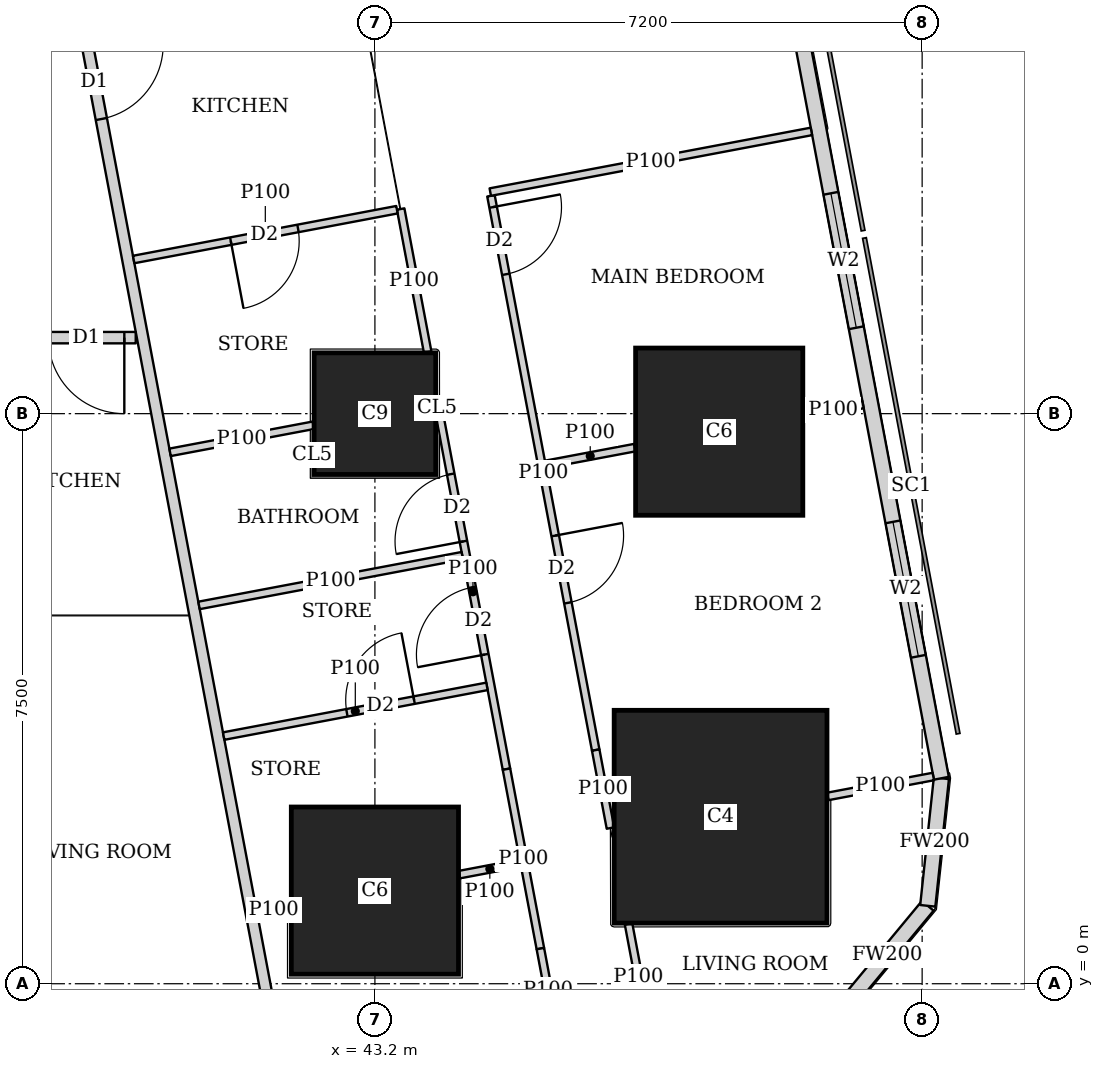
"""IFC4 building model, lengths in metres.
Left out: names, types, materials, properties, quantities, classifications, styles, units other than length and angle.
Written with IfcOpenShell. Run it as: python <this file> out.ifc"""

import sys

from ifc_helpers import new_model, si_unit, direction, frame, frame_2d, origin, origin_2d, place, context, subcontext, project, spatial, rectangle, extrude, element, fill, save


model = new_model("IFC4")
c1 = context("Model", 3, precision=1e-05, world=origin(), true_north=direction((0.0, 1.0)))
c2 = subcontext(c1, "Body", "Model", "MODEL_VIEW")
j1 = project(units=[si_unit("LENGTHUNIT", "METRE"), si_unit("PLANEANGLEUNIT", "RADIAN")], contexts=[c1])
p1 = place(None, origin())
s1 = spatial("IfcSite", under=j1, at=p1, CompositionType="ELEMENT")
p2 = place(p1, origin())
s2 = spatial("IfcBuilding", under=s1, at=p2, CompositionType="ELEMENT")
p3 = place(p2, frame((0.0, 0.0, 89.15)))
s3 = spatial("IfcBuildingStorey", under=s2, at=p3, CompositionType="ELEMENT", Elevation=89.15)
p4 = place(p3, frame((43.2, 1.225, 0.0), z_axis=(0.0, 0.0, 1.0), x_axis=(1.0, 0.0, 0.0)))
e1 = element("IfcColumn", 1, at=p4, inside=s3, PredefinedType="COLUMN", context=c2, shape_type="SweptSolid", body=[
    extrude(rectangle(XDim=2.2, YDim=2.2, at=origin_2d()), origin(), (0.0, 0.0, 1.0), 3.75),
])
p5 = place(p3, frame((47.748, 2.197, 0.0), z_axis=(0.0, 0.0, 1.0), x_axis=(1.0, 0.0, 0.0)))
e2 = element("IfcColumn", 2, at=p5, inside=s3, PredefinedType="COLUMN", context=c2, shape_type="SweptSolid", body=[
    extrude(rectangle(XDim=2.8, YDim=2.8, at=origin_2d()), origin(), (0.0, 0.0, 1.0), 3.75),
])
p6 = place(p3, frame((43.2, 7.5, 0.0), z_axis=(0.0, 0.0, 1.0), x_axis=(1.0, 0.0, 0.0)))
e3 = element("IfcColumn", 3, at=p6, inside=s3, PredefinedType="COLUMN", context=c2, shape_type="SweptSolid", body=[
    extrude(rectangle(XDim=1.6, YDim=1.6, at=origin_2d()), origin(), (0.0, 0.0, 1.0), 3.75),
])
p7 = place(p3, frame((47.73, 7.263, 0.0), z_axis=(0.0, 0.0, 1.0), x_axis=(1.0, 0.0, 0.0)))
e4 = element("IfcColumn", 4, at=p7, inside=s3, PredefinedType="COLUMN", context=c2, shape_type="SweptSolid", body=[
    extrude(rectangle(XDim=2.2, YDim=2.2, at=origin_2d()), origin(), (0.0, 0.0, 1.0), 3.75),
])
p8 = place(p3, frame((49.407, -0.263, 0.0), z_axis=(0.0, 0.0, 1.0), x_axis=(0.638042593423, 0.770001070764, 0.0)))
e5 = element("IfcWall", 5, at=p8, inside=s3, PredefinedType="SOLIDWALL", context=c2, shape_type="SweptSolid", body=[
    extrude(rectangle(XDim=1.673, YDim=0.2, at=frame_2d((0.836, 0.0))), origin(), (0.0, 0.0, 1.0), 3.5),
])
p9 = place(p3, frame((50.474, 1.025, 0.0), z_axis=(0.0, 0.0, 1.0), x_axis=(0.106047815515, 0.994361031429, 0.0)))
e6 = element("IfcWall", 6, at=p9, inside=s3, PredefinedType="SOLIDWALL", context=c2, shape_type="SweptSolid", body=[
    extrude(rectangle(XDim=1.688, YDim=0.2, at=frame_2d((0.844, 0.0))), origin(), (0.0, 0.0, 1.0), 3.5),
])
p10 = place(p3, frame((50.653, 2.703, 0.0), z_axis=(0.0, 0.0, 1.0), x_axis=(-0.185612026696, 0.982623109613, 0.0)))
e7 = element("IfcWall", 7, at=p10, inside=s3, PredefinedType="SOLIDWALL", context=c2, shape_type="SweptSolid", body=[
    extrude(rectangle(XDim=41.393, YDim=0.2, at=frame_2d((20.697, 0.0))), origin(), (0.0, 0.0, 1.0), 3.5),
])
p11 = place(p10, frame((1.633, 0.0, 0.9)))
e8 = element("IfcOpeningElement", 8, at=p11, cuts=e7, PredefinedType="OPENING", context=c2, shape_type="SweptSolid", body=[
    extrude(rectangle(XDim=1.8, YDim=1.5, at=frame_2d((0.9, 0.75))), frame((0.0, 0.11, 0.0), z_axis=(0.0, -1.0, 0.0), x_axis=(1.0, 0.0, 0.0)), (0.0, 0.0, 1.0), 0.22),
])
p12 = place(p10, frame((6.032, 0.0, 0.9)))
e9 = element("IfcOpeningElement", 9, at=p12, cuts=e7, PredefinedType="OPENING", context=c2, shape_type="SweptSolid", body=[
    extrude(rectangle(XDim=1.8, YDim=1.5, at=frame_2d((0.9, 0.75))), frame((0.0, 0.11, 0.0), z_axis=(0.0, -1.0, 0.0), x_axis=(1.0, 0.0, 0.0)), (0.0, 0.0, 1.0), 0.22),
])
p13 = place(p10, frame((9.848, 0.0, 0.9)))
e10 = element("IfcOpeningElement", 10, at=p13, cuts=e7, PredefinedType="OPENING", context=c2, shape_type="SweptSolid", body=[
    extrude(rectangle(XDim=1.8, YDim=1.5, at=frame_2d((0.9, 0.75))), frame((0.0, 0.11, 0.0), z_axis=(0.0, -1.0, 0.0), x_axis=(1.0, 0.0, 0.0)), (0.0, 0.0, 1.0), 0.22),
])
p14 = place(p10, frame((13.664, 0.0, 0.9)))
e11 = element("IfcOpeningElement", 11, at=p14, cuts=e7, PredefinedType="OPENING", context=c2, shape_type="SweptSolid", body=[
    extrude(rectangle(XDim=1.8, YDim=1.5, at=frame_2d((0.9, 0.75))), frame((0.0, 0.11, 0.0), z_axis=(0.0, -1.0, 0.0), x_axis=(1.0, 0.0, 0.0)), (0.0, 0.0, 1.0), 0.22),
])
p15 = place(p10, frame((17.481, 0.0, 0.9)))
e12 = element("IfcOpeningElement", 12, at=p15, cuts=e7, PredefinedType="OPENING", context=c2, shape_type="SweptSolid", body=[
    extrude(rectangle(XDim=1.8, YDim=1.5, at=frame_2d((0.9, 0.75))), frame((0.0, 0.11, 0.0), z_axis=(0.0, -1.0, 0.0), x_axis=(1.0, 0.0, 0.0)), (0.0, 0.0, 1.0), 0.22),
])
p16 = place(p10, frame((21.297, 0.0, 0.9)))
e13 = element("IfcOpeningElement", 13, at=p16, cuts=e7, PredefinedType="OPENING", context=c2, shape_type="SweptSolid", body=[
    extrude(rectangle(XDim=1.8, YDim=1.5, at=frame_2d((0.9, 0.75))), frame((0.0, 0.11, 0.0), z_axis=(0.0, -1.0, 0.0), x_axis=(1.0, 0.0, 0.0)), (0.0, 0.0, 1.0), 0.22),
])
p17 = place(p10, frame((25.113, 0.0, 0.9)))
e14 = element("IfcOpeningElement", 14, at=p17, cuts=e7, PredefinedType="OPENING", context=c2, shape_type="SweptSolid", body=[
    extrude(rectangle(XDim=1.8, YDim=1.5, at=frame_2d((0.9, 0.75))), frame((0.0, 0.11, 0.0), z_axis=(0.0, -1.0, 0.0), x_axis=(1.0, 0.0, 0.0)), (0.0, 0.0, 1.0), 0.22),
])
p18 = place(p10, frame((28.93, 0.0, 0.9)))
e15 = element("IfcOpeningElement", 15, at=p18, cuts=e7, PredefinedType="OPENING", context=c2, shape_type="SweptSolid", body=[
    extrude(rectangle(XDim=1.8, YDim=1.5, at=frame_2d((0.9, 0.75))), frame((0.0, 0.11, 0.0), z_axis=(0.0, -1.0, 0.0), x_axis=(1.0, 0.0, 0.0)), (0.0, 0.0, 1.0), 0.22),
])
p19 = place(p10, frame((32.746, 0.0, 0.9)))
e16 = element("IfcOpeningElement", 16, at=p19, cuts=e7, PredefinedType="OPENING", context=c2, shape_type="SweptSolid", body=[
    extrude(rectangle(XDim=1.8, YDim=1.5, at=frame_2d((0.9, 0.75))), frame((0.0, 0.11, 0.0), z_axis=(0.0, -1.0, 0.0), x_axis=(1.0, 0.0, 0.0)), (0.0, 0.0, 1.0), 0.22),
])
p20 = place(p10, frame((36.481, 0.0, 0.9)))
e17 = element("IfcOpeningElement", 17, at=p20, cuts=e7, PredefinedType="OPENING", context=c2, shape_type="SweptSolid", body=[
    extrude(rectangle(XDim=1.8, YDim=1.5, at=frame_2d((0.9, 0.75))), frame((0.0, 0.11, 0.0), z_axis=(0.0, -1.0, 0.0), x_axis=(1.0, 0.0, 0.0)), (0.0, 0.0, 1.0), 0.22),
])
p21 = place(p3, frame((40.053, 8.5, 0.0), z_axis=(0.0, 0.0, 1.0), x_axis=(-1.0, 0.0, 0.0)))
e18 = element("IfcWall", 18, at=p21, inside=s3, PredefinedType="SOLIDWALL", context=c2, shape_type="SweptSolid", body=[
    extrude(rectangle(XDim=31.703, YDim=0.15, at=frame_2d((15.852, 0.0))), origin(), (0.0, 0.0, 1.0), 3.5),
])
p22 = place(p21, frame((28.103, 0.0, 0.0)))
e19 = element("IfcOpeningElement", 19, at=p22, cuts=e18, PredefinedType="OPENING", context=c2, shape_type="SweptSolid", body=[
    extrude(rectangle(XDim=1.0, YDim=2.1, at=frame_2d((0.5, 1.05))), frame((0.0, 0.085, 0.0), z_axis=(0.0, -1.0, 0.0), x_axis=(1.0, 0.0, 0.0)), (0.0, 0.0, 1.0), 0.17),
])
p23 = place(p21, frame((19.953, 0.0, 0.0)))
e20 = element("IfcOpeningElement", 20, at=p23, cuts=e18, PredefinedType="OPENING", context=c2, shape_type="SweptSolid", body=[
    extrude(rectangle(XDim=1.0, YDim=2.1, at=frame_2d((0.5, 1.05))), frame((0.0, 0.085, 0.0), z_axis=(0.0, -1.0, 0.0), x_axis=(1.0, 0.0, 0.0)), (0.0, 0.0, 1.0), 0.17),
])
p24 = place(p21, frame((12.753, 0.0, 0.0)))
e21 = element("IfcOpeningElement", 21, at=p24, cuts=e18, PredefinedType="OPENING", context=c2, shape_type="SweptSolid", body=[
    extrude(rectangle(XDim=1.0, YDim=2.1, at=frame_2d((0.5, 1.05))), frame((0.0, 0.085, 0.0), z_axis=(0.0, -1.0, 0.0), x_axis=(1.0, 0.0, 0.0)), (0.0, 0.0, 1.0), 0.17),
])
p25 = place(p21, frame((0.15, 0.0, 0.0)))
e22 = element("IfcOpeningElement", 22, at=p25, cuts=e18, PredefinedType="OPENING", context=c2, shape_type="SweptSolid", body=[
    extrude(rectangle(XDim=1.0, YDim=2.1, at=frame_2d((0.5, 1.05))), frame((0.0, 0.085, 0.0), z_axis=(0.0, -1.0, 0.0), x_axis=(1.0, 0.0, 0.0)), (0.0, 0.0, 1.0), 0.17),
])
p26 = place(p3, frame((33.127, 45.65, 0.0), z_axis=(0.0, 0.0, 1.0), x_axis=(0.185598547723, -0.98262565562, 0.0)))
e23 = element("IfcWall", 23, at=p26, inside=s3, PredefinedType="SOLIDWALL", context=c2, shape_type="SweptSolid", body=[
    extrude(rectangle(XDim=47.118, YDim=0.15, at=frame_2d((23.559, 0.0))), origin(), (0.0, 0.0, 1.0), 2.2),
])
p27 = place(p26, frame((15.285, 0.0, 0.0)))
e24 = element("IfcOpeningElement", 24, at=p27, cuts=e23, PredefinedType="OPENING", context=c2, shape_type="SweptSolid", body=[
    extrude(rectangle(XDim=1.0, YDim=2.1, at=frame_2d((0.5, 1.05))), frame((0.0, 0.085, 0.0), z_axis=(0.0, -1.0, 0.0), x_axis=(1.0, 0.0, 0.0)), (0.0, 0.0, 1.0), 0.17),
])
p28 = place(p26, frame((19.102, 0.0, 0.0)))
e25 = element("IfcOpeningElement", 25, at=p28, cuts=e23, PredefinedType="OPENING", context=c2, shape_type="SweptSolid", body=[
    extrude(rectangle(XDim=1.0, YDim=2.1, at=frame_2d((0.5, 1.05))), frame((0.0, 0.085, 0.0), z_axis=(0.0, -1.0, 0.0), x_axis=(1.0, 0.0, 0.0)), (0.0, 0.0, 1.0), 0.17),
])
p29 = place(p26, frame((33.88, 0.0, 0.0)))
e26 = element("IfcOpeningElement", 26, at=p29, cuts=e23, PredefinedType="OPENING", context=c2, shape_type="SweptSolid", body=[
    extrude(rectangle(XDim=1.0, YDim=2.1, at=frame_2d((0.5, 1.05))), frame((0.0, 0.085, 0.0), z_axis=(0.0, -1.0, 0.0), x_axis=(1.0, 0.0, 0.0)), (0.0, 0.0, 1.0), 0.17),
])
p30 = place(p3, frame((44.727, 10.366, 0.0), z_axis=(0.0, 0.0, 1.0), x_axis=(0.185678775129, -0.982610498858, 0.0)))
e27 = element("IfcWall", 27, at=p30, inside=s3, PredefinedType="PARTITIONING", context=c2, shape_type="SweptSolid", body=[
    extrude(rectangle(XDim=7.421, YDim=0.1, at=frame_2d((3.71, 0.0))), origin(), (0.0, 0.0, 1.0), 3.5),
])
p31 = place(p30, frame((0.151, 0.0, 0.0)))
e28 = element("IfcOpeningElement", 28, at=p31, cuts=e27, PredefinedType="OPENING", context=c2, shape_type="SweptSolid", body=[
    extrude(rectangle(XDim=0.9, YDim=2.1, at=frame_2d((0.45, 1.05))), frame((0.0, 0.06, 0.0), z_axis=(0.0, -1.0, 0.0), x_axis=(1.0, 0.0, 0.0)), (0.0, 0.0, 1.0), 0.12),
])
p32 = place(p30, frame((4.55, 0.0, 0.0)))
e29 = element("IfcOpeningElement", 29, at=p32, cuts=e27, PredefinedType="OPENING", context=c2, shape_type="SweptSolid", body=[
    extrude(rectangle(XDim=0.9, YDim=2.1, at=frame_2d((0.45, 1.05))), frame((0.0, 0.06, 0.0), z_axis=(0.0, -1.0, 0.0), x_axis=(1.0, 0.0, 0.0)), (0.0, 0.0, 1.0), 0.12),
])
p33 = place(p3, frame((46.105, 3.074, 0.0), z_axis=(0.0, 0.0, 1.0), x_axis=(0.185897769544, -0.982569091351, 0.0)))
e30 = element("IfcWall", 30, at=p33, inside=s3, PredefinedType="PARTITIONING", context=c2, shape_type="SweptSolid", body=[
    extrude(rectangle(XDim=1.044, YDim=0.1, at=frame_2d((0.522, 0.0))), origin(), (0.0, 0.0, 1.0), 2.05),
])
p34 = place(p3, frame((46.537, 0.787, 0.0), z_axis=(0.0, 0.0, 1.0), x_axis=(0.185348284603, -0.982672892368, 0.0)))
e31 = element("IfcWall", 31, at=p34, inside=s3, PredefinedType="PARTITIONING", context=c2, shape_type="SweptSolid", body=[
    extrude(rectangle(XDim=1.419, YDim=0.1, at=frame_2d((0.709, 0.0))), origin(), (0.0, 0.0, 1.0), 2.05),
])
p35 = place(p3, frame((43.539, 10.192, 0.0), z_axis=(0.0, 0.0, 1.0), x_axis=(0.185366049966, -0.982669541362, 0.0)))
e32 = element("IfcWall", 32, at=p35, inside=s3, PredefinedType="PARTITIONING", context=c2, shape_type="SweptSolid", body=[
    extrude(rectangle(XDim=1.915, YDim=0.1, at=frame_2d((0.958, 0.0))), origin(), (0.0, 0.0, 1.0), 3.5),
])
p36 = place(p3, frame((44.049, 7.49, 0.0), z_axis=(0.0, 0.0, 1.0), x_axis=(0.185666332607, -0.982612849975, 0.0)))
e33 = element("IfcWall", 33, at=p36, inside=s3, PredefinedType="PARTITIONING", context=c2, shape_type="SweptSolid", body=[
    extrude(rectangle(XDim=4.75, YDim=0.1, at=frame_2d((2.375, 0.0))), origin(), (0.0, 0.0, 1.0), 3.5),
])
p37 = place(p36, frame((0.8, 0.0, 0.0)))
e34 = element("IfcOpeningElement", 34, at=p37, cuts=e33, PredefinedType="OPENING", context=c2, shape_type="SweptSolid", body=[
    extrude(rectangle(XDim=0.9, YDim=2.1, at=frame_2d((0.45, 1.05))), frame((0.0, 0.06, 0.0), z_axis=(0.0, -1.0, 0.0), x_axis=(1.0, 0.0, 0.0)), (0.0, 0.0, 1.0), 0.12),
])
p38 = place(p36, frame((2.315, 0.0, 0.0)))
e35 = element("IfcOpeningElement", 35, at=p38, cuts=e33, PredefinedType="OPENING", context=c2, shape_type="SweptSolid", body=[
    extrude(rectangle(XDim=0.9, YDim=2.1, at=frame_2d((0.45, 1.05))), frame((0.0, 0.06, 0.0), z_axis=(0.0, -1.0, 0.0), x_axis=(1.0, 0.0, 0.0)), (0.0, 0.0, 1.0), 0.12),
])
p39 = place(p3, frame((44.931, 2.823, 0.0), z_axis=(0.0, 0.0, 1.0), x_axis=(0.185631845838, -0.982619365681, 0.0)))
e36 = element("IfcWall", 36, at=p39, inside=s3, PredefinedType="PARTITIONING", context=c2, shape_type="SweptSolid", body=[
    extrude(rectangle(XDim=2.403, YDim=0.1, at=frame_2d((1.201, 0.0))), origin(), (0.0, 0.0, 1.0), 2.05),
])
p40 = place(p3, frame((45.377, 0.462, 0.0), z_axis=(0.0, 0.0, 1.0), x_axis=(0.185513480919, -0.982641719243, 0.0)))
e37 = element("IfcWall", 37, at=p40, inside=s3, PredefinedType="PARTITIONING", context=c2, shape_type="SweptSolid", body=[
    extrude(rectangle(XDim=1.095, YDim=0.1, at=frame_2d((0.547, 0.0))), origin(), (0.0, 0.0, 1.0), 3.5),
])
p41 = place(p3, frame((48.943, 11.213, 0.0), z_axis=(0.0, 0.0, 1.0), x_axis=(-0.982633535512, -0.185556823879, 0.0)))
e38 = element("IfcWall", 38, at=p41, inside=s3, PredefinedType="PARTITIONING", context=c2, shape_type="SweptSolid", body=[
    extrude(rectangle(XDim=4.3, YDim=0.1, at=frame_2d((2.15, 0.0))), origin(), (0.0, 0.0, 1.0), 2.2),
])
p42 = place(p3, frame((49.622, 7.62, 0.0), z_axis=(0.0, 0.0, 1.0), x_axis=(-0.982512656401, -0.186195810938, 0.0)))
e39 = element("IfcWall", 39, at=p42, inside=s3, PredefinedType="PARTITIONING", context=c2, shape_type="SweptSolid", body=[
    extrude(rectangle(XDim=0.796, YDim=0.1, at=frame_2d((0.398, 0.0))), origin(), (0.0, 0.0, 1.0), 2.05),
])
p43 = place(p3, frame((46.62, 7.053, 0.0), z_axis=(0.0, 0.0, 1.0), x_axis=(-0.982749355621, -0.18494243436, 0.0)))
e40 = element("IfcWall", 40, at=p43, inside=s3, PredefinedType="PARTITIONING", context=c2, shape_type="SweptSolid", body=[
    extrude(rectangle(XDim=1.195, YDim=0.1, at=frame_2d((0.597, 0.0))), origin(), (0.0, 0.0, 1.0), 2.05),
])
p44 = place(p3, frame((50.547, 2.726, 0.0), z_axis=(0.0, 0.0, 1.0), x_axis=(-0.982680053146, -0.185310315822, 0.0)))
e41 = element("IfcWall", 41, at=p44, inside=s3, PredefinedType="PARTITIONING", context=c2, shape_type="SweptSolid", body=[
    extrude(rectangle(XDim=1.414, YDim=0.1, at=frame_2d((0.707, 0.0))), origin(), (0.0, 0.0, 1.0), 3.5),
])
p45 = place(p3, frame((43.49, 10.183, 0.0), z_axis=(0.0, 0.0, 1.0), x_axis=(-0.982588017646, -0.185797706064, 0.0)))
e42 = element("IfcWall", 42, at=p45, inside=s3, PredefinedType="PARTITIONING", context=c2, shape_type="SweptSolid", body=[
    extrude(rectangle(XDim=3.525, YDim=0.1, at=frame_2d((1.763, 0.0))), origin(), (0.0, 0.0, 1.0), 3.5),
])
p46 = place(p45, frame((1.325, 0.0, 0.0)))
e43 = element("IfcOpeningElement", 43, at=p46, cuts=e42, PredefinedType="OPENING", context=c2, shape_type="SweptSolid", body=[
    extrude(rectangle(XDim=0.9, YDim=2.1, at=frame_2d((0.45, 1.05))), frame((0.0, 0.06, 0.0), z_axis=(0.0, -1.0, 0.0), x_axis=(1.0, 0.0, 0.0)), (0.0, 0.0, 1.0), 0.12),
])
p47 = place(p3, frame((42.39, 7.347, 0.0), z_axis=(0.0, 0.0, 1.0), x_axis=(-0.982633642782, -0.185556255819, 0.0)))
e44 = element("IfcWall", 44, at=p47, inside=s3, PredefinedType="PARTITIONING", context=c2, shape_type="SweptSolid", body=[
    extrude(rectangle(XDim=1.918, YDim=0.1, at=frame_2d((0.959, 0.0))), origin(), (0.0, 0.0, 1.0), 3.5),
])
p48 = place(p3, frame((45.114, 1.587, 0.0), z_axis=(0.0, 0.0, 1.0), x_axis=(-0.982624706348, -0.185603573443, 0.0)))
e45 = element("IfcWall", 45, at=p48, inside=s3, PredefinedType="PARTITIONING", context=c2, shape_type="SweptSolid", body=[
    extrude(rectangle(XDim=0.818, YDim=0.1, at=frame_2d((0.409, 0.0))), origin(), (0.0, 0.0, 1.0), 2.05),
])
p49 = place(p3, frame((42.09, 1.015, 0.0), z_axis=(0.0, 0.0, 1.0), x_axis=(-0.982680384557, -0.185308558375, 0.0)))
e46 = element("IfcWall", 46, at=p49, inside=s3, PredefinedType="PARTITIONING", context=c2, shape_type="SweptSolid", body=[
    extrude(rectangle(XDim=0.448, YDim=0.1, at=frame_2d((0.224, 0.0))), origin(), (0.0, 0.0, 1.0), 2.05),
])
p50 = place(p3, frame((44.35, 5.631, 0.0), z_axis=(0.0, 0.0, 1.0), x_axis=(-0.982638553676, -0.185530247748, 0.0)))
e47 = element("IfcWall", 47, at=p50, inside=s3, PredefinedType="PARTITIONING", context=c2, shape_type="SweptSolid", body=[
    extrude(rectangle(XDim=3.525, YDim=0.1, at=frame_2d((1.763, 0.0))), origin(), (0.0, 0.0, 1.0), 3.5),
])
p51 = place(p3, frame((41.21, 3.258, 0.0), z_axis=(0.0, 0.0, 1.0), x_axis=(0.982638553676, 0.185530247748, 0.0)))
e48 = element("IfcWall", 48, at=p51, inside=s3, PredefinedType="PARTITIONING", context=c2, shape_type="SweptSolid", body=[
    extrude(rectangle(XDim=3.525, YDim=0.1, at=frame_2d((1.763, 0.0))), origin(), (0.0, 0.0, 1.0), 3.5),
])
p52 = place(p51, frame((1.65, 0.0, 0.0)))
e49 = element("IfcOpeningElement", 49, at=p52, cuts=e48, PredefinedType="OPENING", context=c2, shape_type="SweptSolid", body=[
    extrude(rectangle(XDim=0.9, YDim=2.1, at=frame_2d((0.45, 1.05))), frame((0.0, 0.06, 0.0), z_axis=(0.0, -1.0, 0.0), x_axis=(1.0, 0.0, 0.0)), (0.0, 0.0, 1.0), 0.12),
])
p53 = place(p11, origin())
e50 = element("IfcWindow", 50, at=p53, inside=s3, PartitioningType="SINGLE_PANEL", PredefinedType="WINDOW", context=c2, shape_type="SweptSolid", body=[
    extrude(rectangle(XDim=1.8, YDim=1.5, at=frame_2d((0.9, 0.75))), frame((0.0, 0.03, 0.0), z_axis=(0.0, -1.0, 0.0), x_axis=(1.0, 0.0, 0.0)), (0.0, 0.0, 1.0), 0.06),
])
fill(e8, e50)
p54 = place(p12, origin())
e51 = element("IfcWindow", 51, at=p54, inside=s3, PartitioningType="SINGLE_PANEL", PredefinedType="WINDOW", context=c2, shape_type="SweptSolid", body=[
    extrude(rectangle(XDim=1.8, YDim=1.5, at=frame_2d((0.9, 0.75))), frame((0.0, 0.03, 0.0), z_axis=(0.0, -1.0, 0.0), x_axis=(1.0, 0.0, 0.0)), (0.0, 0.0, 1.0), 0.06),
])
fill(e9, e51)
p55 = place(p25, origin())
e52 = element("IfcDoor", 52, at=p55, inside=s3, OperationType="SINGLE_SWING_LEFT", PredefinedType="DOOR", context=c2, shape_type="SweptSolid", body=[
    extrude(rectangle(XDim=1.0, YDim=2.1, at=frame_2d((0.5, 1.05))), frame((0.0, 0.025, 0.0), z_axis=(0.0, -1.0, 0.0), x_axis=(1.0, 0.0, 0.0)), (0.0, 0.0, 1.0), 0.05),
])
fill(e22, e52)
p56 = place(p31, origin())
e53 = element("IfcDoor", 53, at=p56, inside=s3, OperationType="SINGLE_SWING_LEFT", PredefinedType="DOOR", context=c2, shape_type="SweptSolid", body=[
    extrude(rectangle(XDim=0.9, YDim=2.1, at=frame_2d((0.45, 1.05))), frame((0.0, 0.025, 0.0), z_axis=(0.0, -1.0, 0.0), x_axis=(1.0, 0.0, 0.0)), (0.0, 0.0, 1.0), 0.05),
])
fill(e28, e53)
p57 = place(p32, origin())
e54 = element("IfcDoor", 54, at=p57, inside=s3, OperationType="SINGLE_SWING_LEFT", PredefinedType="DOOR", context=c2, shape_type="SweptSolid", body=[
    extrude(rectangle(XDim=0.9, YDim=2.1, at=frame_2d((0.45, 1.05))), frame((0.0, 0.025, 0.0), z_axis=(0.0, -1.0, 0.0), x_axis=(1.0, 0.0, 0.0)), (0.0, 0.0, 1.0), 0.05),
])
fill(e29, e54)
p58 = place(p37, origin())
e55 = element("IfcDoor", 55, at=p58, inside=s3, OperationType="SINGLE_SWING_LEFT", PredefinedType="DOOR", context=c2, shape_type="SweptSolid", body=[
    extrude(rectangle(XDim=0.9, YDim=2.1, at=frame_2d((0.45, 1.05))), frame((0.0, 0.025, 0.0), z_axis=(0.0, -1.0, 0.0), x_axis=(1.0, 0.0, 0.0)), (0.0, 0.0, 1.0), 0.05),
])
fill(e34, e55)
p59 = place(p38, origin())
e56 = element("IfcDoor", 56, at=p59, inside=s3, OperationType="SINGLE_SWING_LEFT", PredefinedType="DOOR", context=c2, shape_type="SweptSolid", body=[
    extrude(rectangle(XDim=0.9, YDim=2.1, at=frame_2d((0.45, 1.05))), frame((0.0, 0.025, 0.0), z_axis=(0.0, -1.0, 0.0), x_axis=(1.0, 0.0, 0.0)), (0.0, 0.0, 1.0), 0.05),
])
fill(e35, e56)
p60 = place(p29, origin())
e57 = element("IfcDoor", 57, at=p60, inside=s3, OperationType="SINGLE_SWING_LEFT", PredefinedType="DOOR", context=c2, shape_type="SweptSolid", body=[
    extrude(rectangle(XDim=1.0, YDim=2.1, at=frame_2d((0.5, 1.05))), frame((0.0, 0.025, 0.0), z_axis=(0.0, -1.0, 0.0), x_axis=(1.0, 0.0, 0.0)), (0.0, 0.0, 1.0), 0.05),
])
fill(e26, e57)
p61 = place(p46, origin())
e58 = element("IfcDoor", 58, at=p61, inside=s3, OperationType="SINGLE_SWING_RIGHT", PredefinedType="DOOR", context=c2, shape_type="SweptSolid", body=[
    extrude(rectangle(XDim=0.9, YDim=2.1, at=frame_2d((0.45, 1.05))), frame((0.0, 0.025, 0.0), z_axis=(0.0, -1.0, 0.0), x_axis=(1.0, 0.0, 0.0)), (0.0, 0.0, 1.0), 0.05),
])
fill(e43, e58)
p62 = place(p52, origin())
e59 = element("IfcDoor", 59, at=p62, inside=s3, OperationType="SINGLE_SWING_RIGHT", PredefinedType="DOOR", context=c2, shape_type="SweptSolid", body=[
    extrude(rectangle(XDim=0.9, YDim=2.1, at=frame_2d((0.45, 1.05))), frame((0.0, 0.025, 0.0), z_axis=(0.0, -1.0, 0.0), x_axis=(1.0, 0.0, 0.0)), (0.0, 0.0, 1.0), 0.05),
])
fill(e49, e59)
save(model, sys.argv[1])
